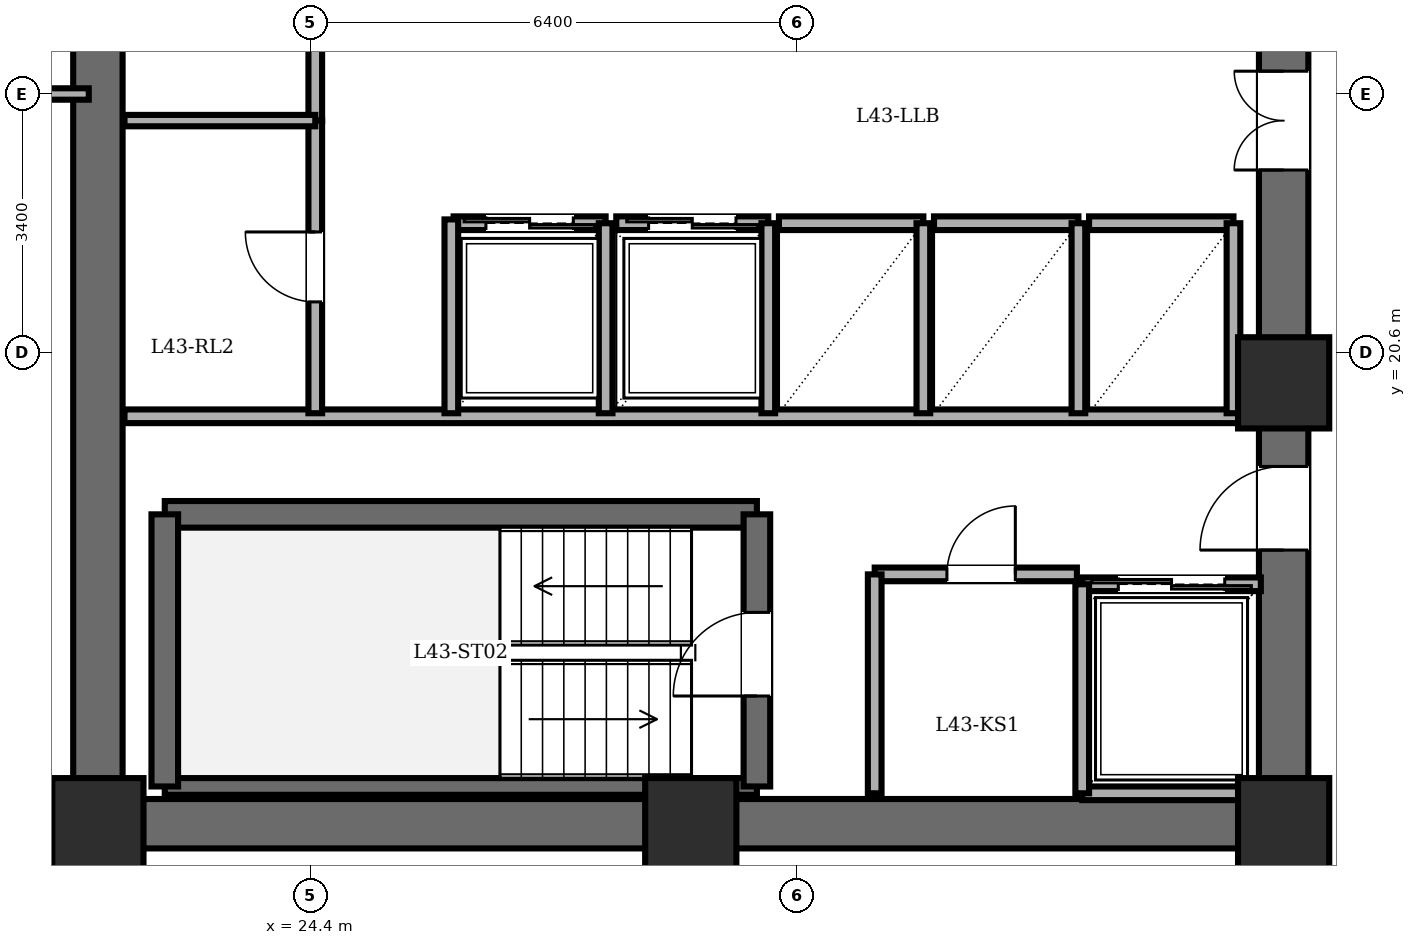
"""IFC4 building model, lengths in metres.
Left out: names, types, materials, properties, quantities, classifications, styles, units other than length and angle.
Written with IfcOpenShell. Run it as: python <this file> out.ifc"""

import sys

from ifc_helpers import new_model, si_unit, direction, frame, frame_2d, origin, origin_2d, place, context, subcontext, project, spatial, rectangle, extrude, element, fill, save


model = new_model("IFC4")
c1 = context("Model", 3, precision=1e-05, world=origin(), true_north=direction((0.0, 1.0)))
c2 = subcontext(c1, "Body", "Model", "MODEL_VIEW")
j1 = project(units=[si_unit("LENGTHUNIT", "METRE"), si_unit("PLANEANGLEUNIT", "RADIAN")], contexts=[c1])
p1 = place(None, origin())
s1 = spatial("IfcSite", under=j1, at=p1, CompositionType="ELEMENT")
p2 = place(p1, origin())
s2 = spatial("IfcBuilding", under=s1, at=p2, CompositionType="ELEMENT")
p3 = place(p2, frame((0.0, 0.0, 165.4)))
s3 = spatial("IfcBuildingStorey", under=s2, at=p3, CompositionType="ELEMENT", Elevation=165.4)
for number, where, z_axis, x_axis in (
    (1, (21.6, 14.4, 0.0), (0.0, 0.0, 1.0), (1.0, 0.0, 0.0)),
    (2, (29.4, 14.4, 0.0), (0.0, 0.0, 1.0), (1.0, 0.0, 0.0)),
    (3, (37.2, 14.4, 0.0), (0.0, 0.0, 1.0), (1.0, 0.0, 0.0)),
    (4, (37.2, 20.2, 0.0), (0.0, 0.0, 1.0), (1.0, 0.0, 0.0)),
):
    element("IfcColumn", number, at=place(p3, frame(where, z_axis=z_axis, x_axis=x_axis)), inside=s3, PredefinedType="COLUMN", context=c2, shape_type="SweptSolid", body=[
        extrude(rectangle(XDim=1.2, YDim=1.2, at=origin_2d()), origin(), (0.0, 0.0, 1.0), 3.6),
    ])
p4 = place(p3, frame((21.6, 14.4, 0.0), z_axis=(0.0, 0.0, 1.0), x_axis=(0.0, 1.0, 0.0)))
e5 = element("IfcWall", 5, at=p4, inside=s3, PredefinedType="SHEAR", context=c2, shape_type="SweptSolid", body=[
    extrude(rectangle(XDim=19.2, YDim=0.65, at=frame_2d((9.6, 0.0))), origin(), (0.0, 0.0, 1.0), 3.4),
])
p5 = place(p3, frame((37.2, 14.4, 0.0), z_axis=(0.0, 0.0, 1.0), x_axis=(-1.0, 0.0, 0.0)))
e6 = element("IfcWall", 6, at=p5, inside=s3, PredefinedType="SHEAR", context=c2, shape_type="SweptSolid", body=[
    extrude(rectangle(XDim=15.6, YDim=0.65, at=frame_2d((7.8, 0.0))), origin(), (0.0, 0.0, 1.0), 3.4),
])
p6 = place(p3, frame((37.2, 14.4, 0.0), z_axis=(0.0, 0.0, 1.0), x_axis=(0.0, 1.0, 0.0)))
e7 = element("IfcWall", 7, at=p6, inside=s3, PredefinedType="SHEAR", context=c2, shape_type="SweptSolid", body=[
    extrude(rectangle(XDim=19.2, YDim=0.65, at=frame_2d((9.6, 0.0))), origin(), (0.0, 0.0, 1.0), 3.4),
])
p7 = place(p6, frame((15.8, 0.0, 0.0)))
e8 = element("IfcOpeningElement", 8, at=p7, cuts=e7, PredefinedType="OPENING", context=c2, shape_type="SweptSolid", body=[
    extrude(rectangle(XDim=1.15, YDim=2.15, at=frame_2d((0.575, 1.075))), frame((0.0, 0.335, 0.0), z_axis=(0.0, -1.0, 0.0), x_axis=(1.0, 0.0, 0.0)), (0.0, 0.0, 1.0), 0.67),
])
p8 = place(p6, frame((3.6, 0.0, 0.0)))
e9 = element("IfcOpeningElement", 9, at=p8, cuts=e7, PredefinedType="OPENING", context=c2, shape_type="SweptSolid", body=[
    extrude(rectangle(XDim=1.1, YDim=2.15, at=frame_2d((0.55, 1.075))), frame((0.0, 0.335, 0.0), z_axis=(0.0, -1.0, 0.0), x_axis=(1.0, 0.0, 0.0)), (0.0, 0.0, 1.0), 0.67),
])
p9 = place(p6, frame((8.6, 0.0, 0.0)))
e10 = element("IfcOpeningElement", 10, at=p9, cuts=e7, PredefinedType="OPENING", context=c2, shape_type="SweptSolid", body=[
    extrude(rectangle(XDim=1.3, YDim=2.2, at=frame_2d((0.65, 1.1))), frame((0.0, 0.335, 0.0), z_axis=(0.0, -1.0, 0.0), x_axis=(1.0, 0.0, 0.0)), (0.0, 0.0, 1.0), 0.67),
])
p10 = place(p3, frame((22.48, 18.47, 0.0), z_axis=(0.0, 0.0, 1.0), x_axis=(1.0, 0.0, 0.0)))
e11 = element("IfcWall", 11, at=p10, inside=s3, PredefinedType="SOLIDWALL", context=c2, shape_type="SweptSolid", body=[
    extrude(rectangle(XDim=7.79, YDim=0.35, at=frame_2d((3.895, 0.0))), origin(), (0.0, 0.0, 1.0), 3.4),
])
p11 = place(p3, frame((22.48, 14.89, 0.0), z_axis=(0.0, 0.0, 1.0), x_axis=(1.0, 0.0, 0.0)))
e12 = element("IfcWall", 12, at=p11, inside=s3, PredefinedType="PARTITIONING", context=c2, shape_type="SweptSolid", body=[
    extrude(rectangle(XDim=7.79, YDim=0.22, at=frame_2d((3.895, 0.0))), origin(), (0.0, 0.0, 1.0), 3.4),
])
p12 = place(p3, frame((22.48, 14.89, 0.0), z_axis=(0.0, 0.0, 1.0), x_axis=(0.0, 1.0, 0.0)))
e13 = element("IfcWall", 13, at=p12, inside=s3, PredefinedType="SOLIDWALL", context=c2, shape_type="SweptSolid", body=[
    extrude(rectangle(XDim=3.58, YDim=0.35, at=frame_2d((1.79, 0.0))), origin(), (0.0, 0.0, 1.0), 3.4),
])
p13 = place(p3, frame((30.27, 14.89, 0.0), z_axis=(0.0, 0.0, 1.0), x_axis=(0.0, 1.0, 0.0)))
e14 = element("IfcWall", 14, at=p13, inside=s3, PredefinedType="SOLIDWALL", context=c2, shape_type="SweptSolid", body=[
    extrude(rectangle(XDim=3.58, YDim=0.35, at=frame_2d((1.79, 0.0))), origin(), (0.0, 0.0, 1.0), 3.4),
])
p14 = place(p13, frame((1.19, 0.0, 0.0)))
e15 = element("IfcOpeningElement", 15, at=p14, cuts=e14, PredefinedType="OPENING", context=c2, shape_type="SweptSolid", body=[
    extrude(rectangle(XDim=1.1, YDim=2.15, at=frame_2d((0.55, 1.075))), frame((0.0, 0.185, 0.0), z_axis=(0.0, -1.0, 0.0), x_axis=(1.0, 0.0, 0.0)), (0.0, 0.0, 1.0), 0.37),
])
p15 = place(p3, frame((21.95, 19.76, 0.0), z_axis=(0.0, 0.0, 1.0), x_axis=(1.0, 0.0, 0.0)))
e16 = element("IfcWall", 16, at=p15, inside=s3, PredefinedType="PARTITIONING", context=c2, shape_type="SweptSolid", body=[
    extrude(rectangle(XDim=14.87, YDim=0.18, at=frame_2d((7.435, 0.0))), origin(), (0.0, 0.0, 1.0), 3.4),
])
p16 = place(p3, frame((31.82, 17.68, 0.0), z_axis=(0.0, 0.0, 1.0), x_axis=(1.0, 0.0, 0.0)))
e17 = element("IfcWall", 17, at=p16, inside=s3, PredefinedType="PARTITIONING", context=c2, shape_type="SweptSolid", body=[
    extrude(rectangle(XDim=2.66, YDim=0.18, at=frame_2d((1.33, 0.0))), origin(), (0.0, 0.0, 1.0), 3.4),
])
p17 = place(p16, frame((0.95, 0.0, 0.0)))
e18 = element("IfcOpeningElement", 18, at=p17, cuts=e17, PredefinedType="OPENING", context=c2, shape_type="SweptSolid", body=[
    extrude(rectangle(XDim=0.9, YDim=2.05, at=frame_2d((0.45, 1.025))), frame((0.0, 0.1, 0.0), z_axis=(0.0, -1.0, 0.0), x_axis=(1.0, 0.0, 0.0)), (0.0, 0.0, 1.0), 0.2),
])
p18 = place(p3, frame((31.82, 14.8, 0.0), z_axis=(0.0, 0.0, 1.0), x_axis=(0.0, 1.0, 0.0)))
e19 = element("IfcWall", 19, at=p18, inside=s3, PredefinedType="PARTITIONING", context=c2, shape_type="SweptSolid", body=[
    extrude(rectangle(XDim=2.88, YDim=0.18, at=frame_2d((1.44, 0.0))), origin(), (0.0, 0.0, 1.0), 3.4),
])
p19 = place(p3, frame((34.55, 17.55, 0.0), z_axis=(0.0, 0.0, 1.0), x_axis=(1.0, 0.0, 0.0)))
e20 = element("IfcWall", 20, at=p19, inside=s3, PredefinedType="PARTITIONING", context=c2, shape_type="SweptSolid", body=[
    extrude(rectangle(XDim=2.35, YDim=0.18, at=frame_2d((1.175, 0.0))), origin(), (0.0, 0.0, 1.0), 3.4),
])
p20 = place(p19, frame((0.475, 0.0, 0.0)))
e21 = element("IfcOpeningElement", 21, at=p20, cuts=e20, PredefinedType="OPENING", context=c2, shape_type="SweptSolid", body=[
    extrude(rectangle(XDim=1.4, YDim=2.3, at=frame_2d((0.7, 1.15))), frame((0.0, 0.1, 0.0), z_axis=(0.0, -1.0, 0.0), x_axis=(1.0, 0.0, 0.0)), (0.0, 0.0, 1.0), 0.2),
])
p21 = place(p3, frame((36.9, 14.8, 0.0), z_axis=(0.0, 0.0, 1.0), x_axis=(-1.0, 0.0, 0.0)))
e22 = element("IfcWall", 22, at=p21, inside=s3, PredefinedType="PARTITIONING", context=c2, shape_type="SweptSolid", body=[
    extrude(rectangle(XDim=2.35, YDim=0.18, at=frame_2d((1.175, 0.0))), origin(), (0.0, 0.0, 1.0), 3.4),
])
p22 = place(p3, frame((34.55, 17.55, 0.0), z_axis=(0.0, 0.0, 1.0), x_axis=(0.0, -1.0, 0.0)))
e23 = element("IfcWall", 23, at=p22, inside=s3, PredefinedType="PARTITIONING", context=c2, shape_type="SweptSolid", body=[
    extrude(rectangle(XDim=2.75, YDim=0.18, at=frame_2d((1.375, 0.0))), origin(), (0.0, 0.0, 1.0), 3.4),
])
p23 = place(p3, frame((26.28, 22.3, 0.0), z_axis=(0.0, 0.0, 1.0), x_axis=(1.0, 0.0, 0.0)))
e24 = element("IfcWall", 24, at=p23, inside=s3, PredefinedType="PARTITIONING", context=c2, shape_type="SweptSolid", body=[
    extrude(rectangle(XDim=2.0, YDim=0.18, at=frame_2d((1.0, 0.0))), origin(), (0.0, 0.0, 1.0), 3.4),
])
p24 = place(p23, frame((0.425, 0.0, 0.0)))
e25 = element("IfcOpeningElement", 25, at=p24, cuts=e24, PredefinedType="OPENING", context=c2, shape_type="SweptSolid", body=[
    extrude(rectangle(XDim=1.15, YDim=2.2, at=frame_2d((0.575, 1.1))), frame((0.0, 0.1, 0.0), z_axis=(0.0, -1.0, 0.0), x_axis=(1.0, 0.0, 0.0)), (0.0, 0.0, 1.0), 0.2),
])
p25 = place(p3, frame((28.28, 19.8, 0.0), z_axis=(0.0, 0.0, 1.0), x_axis=(0.0, 1.0, 0.0)))
e26 = element("IfcWall", 26, at=p25, inside=s3, PredefinedType="PARTITIONING", context=c2, shape_type="SweptSolid", body=[
    extrude(rectangle(XDim=2.5, YDim=0.18, at=frame_2d((1.25, 0.0))), origin(), (0.0, 0.0, 1.0), 3.4),
])
p26 = place(p3, frame((28.42, 22.3, 0.0), z_axis=(0.0, 0.0, 1.0), x_axis=(1.0, 0.0, 0.0)))
e27 = element("IfcWall", 27, at=p26, inside=s3, PredefinedType="PARTITIONING", context=c2, shape_type="SweptSolid", body=[
    extrude(rectangle(XDim=2.0, YDim=0.18, at=frame_2d((1.0, 0.0))), origin(), (0.0, 0.0, 1.0), 3.4),
])
p27 = place(p26, frame((0.425, 0.0, 0.0)))
e28 = element("IfcOpeningElement", 28, at=p27, cuts=e27, PredefinedType="OPENING", context=c2, shape_type="SweptSolid", body=[
    extrude(rectangle(XDim=1.15, YDim=2.2, at=frame_2d((0.575, 1.1))), frame((0.0, 0.1, 0.0), z_axis=(0.0, -1.0, 0.0), x_axis=(1.0, 0.0, 0.0)), (0.0, 0.0, 1.0), 0.2),
])
p28 = place(p3, frame((30.42, 19.8, 0.0), z_axis=(0.0, 0.0, 1.0), x_axis=(0.0, 1.0, 0.0)))
e29 = element("IfcWall", 29, at=p28, inside=s3, PredefinedType="PARTITIONING", context=c2, shape_type="SweptSolid", body=[
    extrude(rectangle(XDim=2.5, YDim=0.18, at=frame_2d((1.25, 0.0))), origin(), (0.0, 0.0, 1.0), 3.4),
])
p29 = place(p3, frame((30.56, 22.3, 0.0), z_axis=(0.0, 0.0, 1.0), x_axis=(1.0, 0.0, 0.0)))
e30 = element("IfcWall", 30, at=p29, inside=s3, PredefinedType="PARTITIONING", context=c2, shape_type="SweptSolid", body=[
    extrude(rectangle(XDim=1.9, YDim=0.18, at=frame_2d((0.95, 0.0))), origin(), (0.0, 0.0, 1.0), 3.4),
])
p30 = place(p3, frame((32.46, 19.8, 0.0), z_axis=(0.0, 0.0, 1.0), x_axis=(0.0, 1.0, 0.0)))
e31 = element("IfcWall", 31, at=p30, inside=s3, PredefinedType="PARTITIONING", context=c2, shape_type="SweptSolid", body=[
    extrude(rectangle(XDim=2.5, YDim=0.18, at=frame_2d((1.25, 0.0))), origin(), (0.0, 0.0, 1.0), 3.4),
])
p31 = place(p3, frame((32.6, 22.3, 0.0), z_axis=(0.0, 0.0, 1.0), x_axis=(1.0, 0.0, 0.0)))
e32 = element("IfcWall", 32, at=p31, inside=s3, PredefinedType="PARTITIONING", context=c2, shape_type="SweptSolid", body=[
    extrude(rectangle(XDim=1.9, YDim=0.18, at=frame_2d((0.95, 0.0))), origin(), (0.0, 0.0, 1.0), 3.4),
])
p32 = place(p3, frame((34.5, 19.8, 0.0), z_axis=(0.0, 0.0, 1.0), x_axis=(0.0, 1.0, 0.0)))
e33 = element("IfcWall", 33, at=p32, inside=s3, PredefinedType="PARTITIONING", context=c2, shape_type="SweptSolid", body=[
    extrude(rectangle(XDim=2.5, YDim=0.18, at=frame_2d((1.25, 0.0))), origin(), (0.0, 0.0, 1.0), 3.4),
])
p33 = place(p3, frame((34.64, 22.3, 0.0), z_axis=(0.0, 0.0, 1.0), x_axis=(1.0, 0.0, 0.0)))
e34 = element("IfcWall", 34, at=p33, inside=s3, PredefinedType="PARTITIONING", context=c2, shape_type="SweptSolid", body=[
    extrude(rectangle(XDim=1.9, YDim=0.18, at=frame_2d((0.95, 0.0))), origin(), (0.0, 0.0, 1.0), 3.4),
])
p34 = place(p3, frame((36.54, 19.8, 0.0), z_axis=(0.0, 0.0, 1.0), x_axis=(0.0, 1.0, 0.0)))
e35 = element("IfcWall", 35, at=p34, inside=s3, PredefinedType="PARTITIONING", context=c2, shape_type="SweptSolid", body=[
    extrude(rectangle(XDim=2.5, YDim=0.18, at=frame_2d((1.25, 0.0))), origin(), (0.0, 0.0, 1.0), 3.4),
])
p35 = place(p3, frame((24.46, 23.65, 0.0), z_axis=(0.0, 0.0, 1.0), x_axis=(0.0, 1.0, 0.0)))
e36 = element("IfcWall", 36, at=p35, inside=s3, PredefinedType="PARTITIONING", context=c2, shape_type="SweptSolid", body=[
    extrude(rectangle(XDim=3.85, YDim=0.18, at=frame_2d((1.925, 0.0))), origin(), (0.0, 0.0, 1.0), 3.4),
])
p36 = place(p35, frame((1.465, 0.0, 0.0)))
e37 = element("IfcOpeningElement", 37, at=p36, cuts=e36, PredefinedType="OPENING", context=c2, shape_type="SweptSolid", body=[
    extrude(rectangle(XDim=0.92, YDim=2.1, at=frame_2d((0.46, 1.05))), frame((0.0, 0.1, 0.0), z_axis=(0.0, -1.0, 0.0), x_axis=(1.0, 0.0, 0.0)), (0.0, 0.0, 1.0), 0.2),
])
p37 = place(p3, frame((24.46, 19.8, 0.0), z_axis=(0.0, 0.0, 1.0), x_axis=(0.0, 1.0, 0.0)))
e38 = element("IfcWall", 38, at=p37, inside=s3, PredefinedType="PARTITIONING", context=c2, shape_type="SweptSolid", body=[
    extrude(rectangle(XDim=3.85, YDim=0.18, at=frame_2d((1.925, 0.0))), origin(), (0.0, 0.0, 1.0), 3.4),
])
p38 = place(p37, frame((1.465, 0.0, 0.0)))
e39 = element("IfcOpeningElement", 39, at=p38, cuts=e38, PredefinedType="OPENING", context=c2, shape_type="SweptSolid", body=[
    extrude(rectangle(XDim=0.92, YDim=2.1, at=frame_2d((0.46, 1.05))), frame((0.0, 0.1, 0.0), z_axis=(0.0, -1.0, 0.0), x_axis=(1.0, 0.0, 0.0)), (0.0, 0.0, 1.0), 0.2),
])
p39 = place(p3, frame((21.95, 23.65, 0.0), z_axis=(0.0, 0.0, 1.0), x_axis=(1.0, 0.0, 0.0)))
e40 = element("IfcWall", 40, at=p39, inside=s3, PredefinedType="PARTITIONING", context=c2, shape_type="SweptSolid", body=[
    extrude(rectangle(XDim=2.51, YDim=0.15, at=frame_2d((1.255, 0.0))), origin(), (0.0, 0.0, 1.0), 3.4),
])
p40 = place(p3, frame((26.25, 19.8, 0.0), z_axis=(0.0, 0.0, 1.0), x_axis=(0.0, 1.0, 0.0)))
e41 = element("IfcWall", 41, at=p40, inside=s3, PredefinedType="PARTITIONING", context=c2, shape_type="SweptSolid", body=[
    extrude(rectangle(XDim=2.55, YDim=0.18, at=frame_2d((1.275, 0.0))), origin(), (0.0, 0.0, 1.0), 3.4),
])
p41 = place(p3, frame((13.8, 14.18, 0.0), z_axis=(0.0, 0.0, 1.0), x_axis=(1.0, 0.0, 0.0)))
e42 = element("IfcWall", 42, at=p41, inside=s3, PredefinedType="PARTITIONING", context=c2, shape_type="SweptSolid", body=[
    extrude(rectangle(XDim=7.68, YDim=0.15, at=frame_2d((3.84, 0.0))), origin(), (0.0, 0.0, 1.0), 3.4),
])
p42 = place(p41, frame((3.68, 0.0, 0.0)))
e43 = element("IfcOpeningElement", 43, at=p42, cuts=e42, PredefinedType="OPENING", context=c2, shape_type="SweptSolid", body=[
    extrude(rectangle(XDim=1.0, YDim=2.15, at=frame_2d((0.5, 1.075))), frame((0.0, 0.085, 0.0), z_axis=(0.0, -1.0, 0.0), x_axis=(1.0, 0.0, 0.0)), (0.0, 0.0, 1.0), 0.17),
])
p43 = place(p3, frame((13.8, 24.0, 0.0), z_axis=(0.0, 0.0, 1.0), x_axis=(1.0, 0.0, 0.0)))
e44 = element("IfcWall", 44, at=p43, inside=s3, PredefinedType="PARTITIONING", context=c2, shape_type="SweptSolid", body=[
    extrude(rectangle(XDim=7.68, YDim=0.15, at=frame_2d((3.84, 0.0))), origin(), (0.0, 0.0, 1.0), 3.4),
])
p44 = place(p14, origin())
e45 = element("IfcDoor", 45, at=p44, inside=s3, OperationType="SINGLE_SWING_LEFT", PredefinedType="DOOR", context=c2, shape_type="SweptSolid", body=[
    extrude(rectangle(XDim=1.1, YDim=2.15, at=frame_2d((0.55, 1.075))), frame((0.0, 0.025, 0.0), z_axis=(0.0, -1.0, 0.0), x_axis=(1.0, 0.0, 0.0)), (0.0, 0.0, 1.0), 0.05),
])
fill(e15, e45)
p45 = place(p8, origin())
e46 = element("IfcDoor", 46, at=p45, inside=s3, OperationType="SINGLE_SWING_LEFT", PredefinedType="DOOR", context=c2, shape_type="SweptSolid", body=[
    extrude(rectangle(XDim=1.1, YDim=2.15, at=frame_2d((0.55, 1.075))), frame((0.0, 0.025, 0.0), z_axis=(0.0, -1.0, 0.0), x_axis=(1.0, 0.0, 0.0)), (0.0, 0.0, 1.0), 0.05),
])
fill(e9, e46)
p46 = place(p17, origin())
e47 = element("IfcDoor", 47, at=p46, inside=s3, OperationType="SINGLE_SWING_RIGHT", PredefinedType="DOOR", context=c2, shape_type="SweptSolid", body=[
    extrude(rectangle(XDim=0.9, YDim=2.05, at=frame_2d((0.45, 1.025))), frame((0.0, 0.025, 0.0), z_axis=(0.0, -1.0, 0.0), x_axis=(1.0, 0.0, 0.0)), (0.0, 0.0, 1.0), 0.05),
])
fill(e18, e47)
p47 = place(p20, origin())
e48 = element("IfcDoor", 48, at=p47, inside=s3, OperationType="DOUBLE_DOOR_SLIDING", PredefinedType="DOOR", context=c2, shape_type="SweptSolid", body=[
    extrude(rectangle(XDim=1.4, YDim=2.3, at=frame_2d((0.7, 1.15))), frame((0.0, 0.025, 0.0), z_axis=(0.0, -1.0, 0.0), x_axis=(1.0, 0.0, 0.0)), (0.0, 0.0, 1.0), 0.05),
])
fill(e21, e48)
p48 = place(p24, origin())
e49 = element("IfcDoor", 49, at=p48, inside=s3, OperationType="DOUBLE_DOOR_SLIDING", PredefinedType="DOOR", context=c2, shape_type="SweptSolid", body=[
    extrude(rectangle(XDim=1.15, YDim=2.2, at=frame_2d((0.575, 1.1))), frame((0.0, 0.025, 0.0), z_axis=(0.0, -1.0, 0.0), x_axis=(1.0, 0.0, 0.0)), (0.0, 0.0, 1.0), 0.05),
])
fill(e25, e49)
p49 = place(p27, origin())
e50 = element("IfcDoor", 50, at=p49, inside=s3, OperationType="DOUBLE_DOOR_SLIDING", PredefinedType="DOOR", context=c2, shape_type="SweptSolid", body=[
    extrude(rectangle(XDim=1.15, YDim=2.2, at=frame_2d((0.575, 1.1))), frame((0.0, 0.025, 0.0), z_axis=(0.0, -1.0, 0.0), x_axis=(1.0, 0.0, 0.0)), (0.0, 0.0, 1.0), 0.05),
])
fill(e28, e50)
p50 = place(p38, origin())
e51 = element("IfcDoor", 51, at=p50, inside=s3, OperationType="SINGLE_SWING_RIGHT", PredefinedType="DOOR", context=c2, shape_type="SweptSolid", body=[
    extrude(rectangle(XDim=0.92, YDim=2.1, at=frame_2d((0.46, 1.05))), frame((0.0, 0.025, 0.0), z_axis=(0.0, -1.0, 0.0), x_axis=(1.0, 0.0, 0.0)), (0.0, 0.0, 1.0), 0.05),
])
fill(e39, e51)
p51 = place(p9, origin())
e52 = element("IfcDoor", 52, at=p51, inside=s3, OperationType="DOUBLE_DOOR_SINGLE_SWING", PredefinedType="DOOR", context=c2, shape_type="SweptSolid", body=[
    extrude(rectangle(XDim=1.3, YDim=2.2, at=frame_2d((0.65, 1.1))), frame((0.0, 0.025, 0.0), z_axis=(0.0, -1.0, 0.0), x_axis=(1.0, 0.0, 0.0)), (0.0, 0.0, 1.0), 0.05),
])
fill(e10, e52)
save(model, sys.argv[1])
